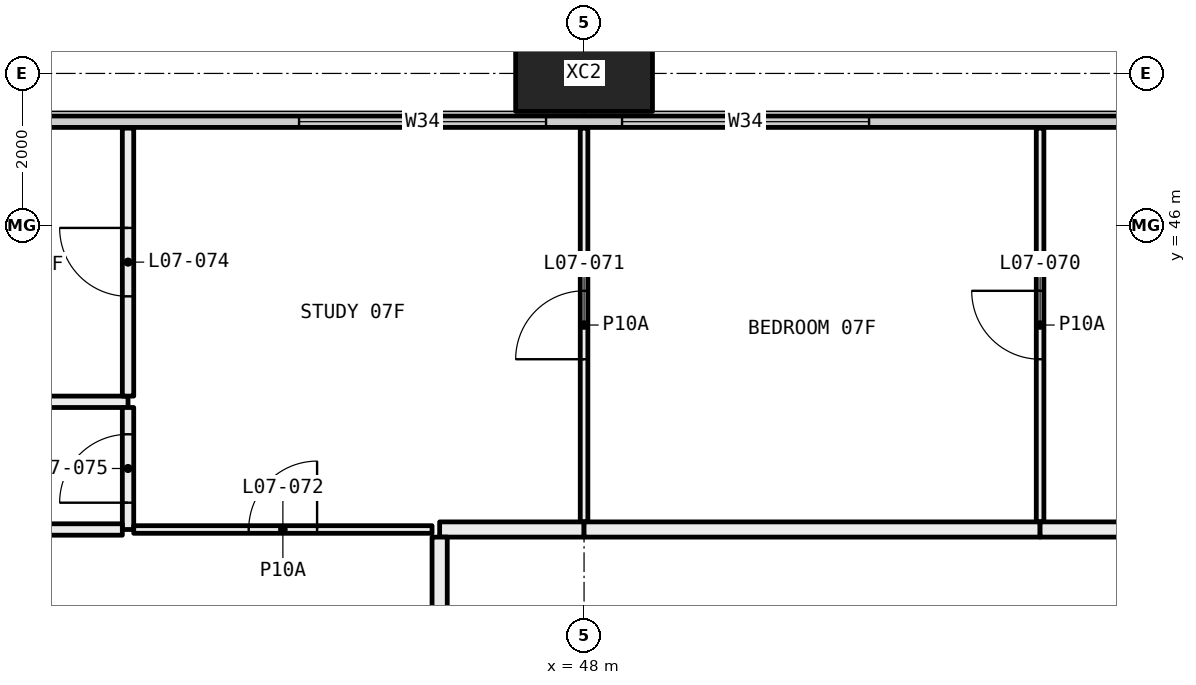
"""IFC4 building model, lengths in metres.
Left out: names, types, materials, properties, quantities, classifications, styles, units other than length and angle.
Written with IfcOpenShell. Run it as: python <this file> out.ifc"""

import sys

from ifc_helpers import new_model, si_unit, direction, frame, frame_2d, origin, origin_2d, place, context, subcontext, project, spatial, rectangle, hollow_rectangle, extrude, element, fill, save


model = new_model("IFC4")
c1 = context("Model", 3, precision=1e-05, world=origin(), true_north=direction((0.0, 1.0)))
c2 = subcontext(c1, "Body", "Model", "MODEL_VIEW")
j1 = project(units=[si_unit("LENGTHUNIT", "METRE"), si_unit("PLANEANGLEUNIT", "RADIAN")], contexts=[c1])
p1 = place(None, origin())
s1 = spatial("IfcSite", under=j1, at=p1, CompositionType="ELEMENT")
p2 = place(p1, origin())
s2 = spatial("IfcBuilding", under=s1, at=p2, CompositionType="ELEMENT")
p3 = place(p2, frame((0.0, 0.0, 36.9)))
s3 = spatial("IfcBuildingStorey", under=s2, at=p3, CompositionType="ELEMENT", Elevation=36.9)
p4 = place(p3, frame((48.0, 48.0, -0.4), z_axis=(0.0, 0.0, 1.0), x_axis=(1.0, 0.0, 0.0)))
e1 = element("IfcColumn", 1, at=p4, inside=s3, PredefinedType="COLUMN", context=c2, shape_type="SweptSolid", body=[
    extrude(hollow_rectangle(XDim=1.8, YDim=1.0, WallThickness=0.07, at=origin_2d()), origin(), (0.0, 0.0, 1.0), 3.45),
])
p5 = place(p3, frame((6.56, 47.365, 0.0), z_axis=(0.0, 0.0, 1.0), x_axis=(1.0, 0.0, 0.0)))
e2 = element("IfcWall", 2, at=p5, inside=s3, PredefinedType="ELEMENTEDWALL", context=c2, shape_type="SweptSolid", body=[
    extrude(rectangle(XDim=58.88, YDim=0.15, at=frame_2d((29.44, 0.0))), origin(), (0.0, 0.0, 1.0), 3.05),
])
p6 = place(p5, frame((0.44, 0.0, 0.45)))
e3 = element("IfcOpeningElement", 3, at=p6, cuts=e2, PredefinedType="OPENING", context=c2, shape_type="SweptSolid", body=[
    extrude(rectangle(XDim=4.5, YDim=2.55, at=frame_2d((2.25, 1.275))), frame((0.0, 0.085, 0.0), z_axis=(0.0, -1.0, 0.0), x_axis=(1.0, 0.0, 0.0)), (0.0, 0.0, 1.0), 0.17),
])
p7 = place(p5, frame((5.94, 0.0, 0.45)))
e4 = element("IfcOpeningElement", 4, at=p7, cuts=e2, PredefinedType="OPENING", context=c2, shape_type="SweptSolid", body=[
    extrude(rectangle(XDim=3.25, YDim=2.55, at=frame_2d((1.625, 1.275))), frame((0.0, 0.085, 0.0), z_axis=(0.0, -1.0, 0.0), x_axis=(1.0, 0.0, 0.0)), (0.0, 0.0, 1.0), 0.17),
])
p8 = place(p5, frame((13.69, 0.0, 0.45)))
e5 = element("IfcOpeningElement", 5, at=p8, cuts=e2, PredefinedType="OPENING", context=c2, shape_type="SweptSolid", body=[
    extrude(rectangle(XDim=3.25, YDim=2.55, at=frame_2d((1.625, 1.275))), frame((0.0, 0.085, 0.0), z_axis=(0.0, -1.0, 0.0), x_axis=(1.0, 0.0, 0.0)), (0.0, 0.0, 1.0), 0.17),
])
p9 = place(p5, frame((17.94, 0.0, 0.45)))
e6 = element("IfcOpeningElement", 6, at=p9, cuts=e2, PredefinedType="OPENING", context=c2, shape_type="SweptSolid", body=[
    extrude(rectangle(XDim=3.25, YDim=2.55, at=frame_2d((1.625, 1.275))), frame((0.0, 0.085, 0.0), z_axis=(0.0, -1.0, 0.0), x_axis=(1.0, 0.0, 0.0)), (0.0, 0.0, 1.0), 0.17),
])
p10 = place(p5, frame((26.94, 0.0, 0.45)))
e7 = element("IfcOpeningElement", 7, at=p10, cuts=e2, PredefinedType="OPENING", context=c2, shape_type="SweptSolid", body=[
    extrude(rectangle(XDim=2.0, YDim=2.55, at=frame_2d((1.0, 1.275))), frame((0.0, 0.085, 0.0), z_axis=(0.0, -1.0, 0.0), x_axis=(1.0, 0.0, 0.0)), (0.0, 0.0, 1.0), 0.17),
])
p11 = place(p5, frame((29.94, 0.0, 0.45)))
e8 = element("IfcOpeningElement", 8, at=p11, cuts=e2, PredefinedType="OPENING", context=c2, shape_type="SweptSolid", body=[
    extrude(rectangle(XDim=3.25, YDim=2.55, at=frame_2d((1.625, 1.275))), frame((0.0, 0.085, 0.0), z_axis=(0.0, -1.0, 0.0), x_axis=(1.0, 0.0, 0.0)), (0.0, 0.0, 1.0), 0.17),
])
p12 = place(p5, frame((37.69, 0.0, 0.45)))
e9 = element("IfcOpeningElement", 9, at=p12, cuts=e2, PredefinedType="OPENING", context=c2, shape_type="SweptSolid", body=[
    extrude(rectangle(XDim=3.25, YDim=2.55, at=frame_2d((1.625, 1.275))), frame((0.0, 0.085, 0.0), z_axis=(0.0, -1.0, 0.0), x_axis=(1.0, 0.0, 0.0)), (0.0, 0.0, 1.0), 0.17),
])
p13 = place(p5, frame((41.94, 0.0, 0.45)))
e10 = element("IfcOpeningElement", 10, at=p13, cuts=e2, PredefinedType="OPENING", context=c2, shape_type="SweptSolid", body=[
    extrude(rectangle(XDim=3.25, YDim=2.55, at=frame_2d((1.625, 1.275))), frame((0.0, 0.085, 0.0), z_axis=(0.0, -1.0, 0.0), x_axis=(1.0, 0.0, 0.0)), (0.0, 0.0, 1.0), 0.17),
])
p14 = place(p5, frame((50.94, 0.0, 0.45)))
e11 = element("IfcOpeningElement", 11, at=p14, cuts=e2, PredefinedType="OPENING", context=c2, shape_type="SweptSolid", body=[
    extrude(rectangle(XDim=2.0, YDim=2.55, at=frame_2d((1.0, 1.275))), frame((0.0, 0.085, 0.0), z_axis=(0.0, -1.0, 0.0), x_axis=(1.0, 0.0, 0.0)), (0.0, 0.0, 1.0), 0.17),
])
p15 = place(p5, frame((53.94, 0.0, 0.45)))
e12 = element("IfcOpeningElement", 12, at=p15, cuts=e2, PredefinedType="OPENING", context=c2, shape_type="SweptSolid", body=[
    extrude(rectangle(XDim=4.5, YDim=2.55, at=frame_2d((2.25, 1.275))), frame((0.0, 0.085, 0.0), z_axis=(0.0, -1.0, 0.0), x_axis=(1.0, 0.0, 0.0)), (0.0, 0.0, 1.0), 0.17),
])
p16 = place(p3, frame((36.1, 43.68, 0.0), z_axis=(0.0, 0.0, 1.0), x_axis=(1.0, 0.0, 0.0)))
e13 = element("IfcWall", 13, at=p16, inside=s3, PredefinedType="PARTITIONING", context=c2, shape_type="SweptSolid", body=[
    extrude(rectangle(XDim=5.9, YDim=0.15, at=frame_2d((2.95, 0.0))), origin(), (0.0, 0.0, 1.0), 3.05),
])
p17 = place(p3, frame((42.0, 43.755, 0.0), z_axis=(0.0, 0.0, 1.0), x_axis=(0.0, 1.0, 0.0)))
e14 = element("IfcWall", 14, at=p17, inside=s3, PredefinedType="PARTITIONING", context=c2, shape_type="SweptSolid", body=[
    extrude(rectangle(XDim=3.525, YDim=0.15, at=frame_2d((1.763, 0.0))), origin(), (0.0, 0.0, 1.0), 3.05),
])
p18 = place(p17, frame((1.312, 0.0, 0.0)))
e15 = element("IfcOpeningElement", 15, at=p18, cuts=e14, PredefinedType="OPENING", context=c2, shape_type="SweptSolid", body=[
    extrude(rectangle(XDim=0.9, YDim=2.1, at=frame_2d((0.45, 1.05))), frame((0.0, 0.085, 0.0), z_axis=(0.0, -1.0, 0.0), x_axis=(1.0, 0.0, 0.0)), (0.0, 0.0, 1.0), 0.17),
])
p19 = place(p3, frame((42.0, 42.0, 0.0), z_axis=(0.0, 0.0, 1.0), x_axis=(0.0, 1.0, 0.0)))
e16 = element("IfcWall", 16, at=p19, inside=s3, PredefinedType="PARTITIONING", context=c2, shape_type="SweptSolid", body=[
    extrude(rectangle(XDim=1.605, YDim=0.15, at=frame_2d((0.802, 0.0))), origin(), (0.0, 0.0, 1.0), 3.05),
])
p20 = place(p19, frame((0.353, 0.0, 0.0)))
e17 = element("IfcOpeningElement", 17, at=p20, cuts=e16, PredefinedType="OPENING", context=c2, shape_type="SweptSolid", body=[
    extrude(rectangle(XDim=0.9, YDim=2.1, at=frame_2d((0.45, 1.05))), frame((0.0, 0.085, 0.0), z_axis=(0.0, -1.0, 0.0), x_axis=(1.0, 0.0, 0.0)), (0.0, 0.0, 1.0), 0.17),
])
p21 = place(p3, frame((40.5, 42.0, 0.0), z_axis=(0.0, 0.0, 1.0), x_axis=(1.0, 0.0, 0.0)))
e18 = element("IfcWall", 18, at=p21, inside=s3, PredefinedType="PARTITIONING", context=c2, shape_type="SweptSolid", body=[
    extrude(rectangle(XDim=1.425, YDim=0.15, at=frame_2d((0.712, 0.0))), origin(), (0.0, 0.0, 1.0), 3.05),
])
p22 = place(p3, frame((48.0, 42.1, 0.0), z_axis=(0.0, 0.0, 1.0), x_axis=(0.0, 1.0, 0.0)))
e19 = element("IfcWall", 19, at=p22, inside=s3, PredefinedType="PARTITIONING", context=c2, shape_type="SweptSolid", body=[
    extrude(rectangle(XDim=5.18, YDim=0.1, at=frame_2d((2.59, 0.0))), origin(), (0.0, 0.0, 1.0), 3.05),
])
p23 = place(p22, frame((2.14, 0.0, 0.0)))
e20 = element("IfcOpeningElement", 20, at=p23, cuts=e19, PredefinedType="OPENING", context=c2, shape_type="SweptSolid", body=[
    extrude(rectangle(XDim=0.9, YDim=2.1, at=frame_2d((0.45, 1.05))), frame((0.0, 0.06, 0.0), z_axis=(0.0, -1.0, 0.0), x_axis=(1.0, 0.0, 0.0)), (0.0, 0.0, 1.0), 0.12),
])
p24 = place(p3, frame((42.075, 42.0, 0.0), z_axis=(0.0, 0.0, 1.0), x_axis=(1.0, 0.0, 0.0)))
e21 = element("IfcWall", 21, at=p24, inside=s3, PredefinedType="PARTITIONING", context=c2, shape_type="SweptSolid", body=[
    extrude(rectangle(XDim=3.925, YDim=0.1, at=frame_2d((1.962, 0.0))), origin(), (0.0, 0.0, 1.0), 3.05),
])
p25 = place(p24, frame((1.512, 0.0, 0.0)))
e22 = element("IfcOpeningElement", 22, at=p25, cuts=e21, PredefinedType="OPENING", context=c2, shape_type="SweptSolid", body=[
    extrude(rectangle(XDim=0.9, YDim=2.1, at=frame_2d((0.45, 1.05))), frame((0.0, 0.06, 0.0), z_axis=(0.0, -1.0, 0.0), x_axis=(1.0, 0.0, 0.0)), (0.0, 0.0, 1.0), 0.12),
])
p26 = place(p3, frame((46.1, 42.0, 0.0), z_axis=(0.0, 0.0, 1.0), x_axis=(1.0, 0.0, 0.0)))
e23 = element("IfcWall", 23, at=p26, inside=s3, PredefinedType="PARTITIONING", context=c2, shape_type="SweptSolid", body=[
    extrude(rectangle(XDim=1.9, YDim=0.2, at=frame_2d((0.95, 0.0))), origin(), (0.0, 0.0, 1.0), 3.05),
])
p27 = place(p3, frame((54.0, 42.1, 0.0), z_axis=(0.0, 0.0, 1.0), x_axis=(0.0, 1.0, 0.0)))
e24 = element("IfcWall", 24, at=p27, inside=s3, PredefinedType="PARTITIONING", context=c2, shape_type="SweptSolid", body=[
    extrude(rectangle(XDim=5.18, YDim=0.1, at=frame_2d((2.59, 0.0))), origin(), (0.0, 0.0, 1.0), 3.05),
])
p28 = place(p27, frame((2.14, 0.0, 0.0)))
e25 = element("IfcOpeningElement", 25, at=p28, cuts=e24, PredefinedType="OPENING", context=c2, shape_type="SweptSolid", body=[
    extrude(rectangle(XDim=0.9, YDim=2.1, at=frame_2d((0.45, 1.05))), frame((0.0, 0.06, 0.0), z_axis=(0.0, -1.0, 0.0), x_axis=(1.0, 0.0, 0.0)), (0.0, 0.0, 1.0), 0.12),
])
p29 = place(p3, frame((48.0, 42.0, 0.0), z_axis=(0.0, 0.0, 1.0), x_axis=(1.0, 0.0, 0.0)))
e26 = element("IfcWall", 26, at=p29, inside=s3, PredefinedType="PARTITIONING", context=c2, shape_type="SweptSolid", body=[
    extrude(rectangle(XDim=6.0, YDim=0.2, at=frame_2d((3.0, 0.0))), origin(), (0.0, 0.0, 1.0), 3.05),
])
p30 = place(p3, frame((54.0, 42.0, 0.0), z_axis=(0.0, 0.0, 1.0), x_axis=(1.0, 0.0, 0.0)))
e27 = element("IfcWall", 27, at=p30, inside=s3, PredefinedType="PARTITIONING", context=c2, shape_type="SweptSolid", body=[
    extrude(rectangle(XDim=6.0, YDim=0.2, at=frame_2d((3.0, 0.0))), origin(), (0.0, 0.0, 1.0), 3.05),
])
p31 = place(p30, frame((2.5, 0.0, 0.0)))
e28 = element("IfcOpeningElement", 28, at=p31, cuts=e27, PredefinedType="OPENING", context=c2, shape_type="SweptSolid", body=[
    extrude(rectangle(XDim=1.0, YDim=2.1, at=frame_2d((0.5, 1.05))), frame((0.0, 0.11, 0.0), z_axis=(0.0, -1.0, 0.0), x_axis=(1.0, 0.0, 0.0)), (0.0, 0.0, 1.0), 0.22),
])
p32 = place(p3, frame((46.1, 36.1, 0.0), z_axis=(0.0, 0.0, 1.0), x_axis=(0.0, 1.0, 0.0)))
e29 = element("IfcWall", 29, at=p32, inside=s3, PredefinedType="PARTITIONING", context=c2, shape_type="SweptSolid", body=[
    extrude(rectangle(XDim=5.8, YDim=0.2, at=frame_2d((2.9, 0.0))), origin(), (0.0, 0.0, 1.0), 3.05),
])
p33 = place(p12, origin())
e30 = element("IfcWindow", 30, at=p33, inside=s3, PartitioningType="SINGLE_PANEL", PredefinedType="WINDOW", context=c2, shape_type="SweptSolid", body=[
    extrude(rectangle(XDim=3.25, YDim=2.55, at=frame_2d((1.625, 1.275))), frame((0.0, 0.03, 0.0), z_axis=(0.0, -1.0, 0.0), x_axis=(1.0, 0.0, 0.0)), (0.0, 0.0, 1.0), 0.06),
])
fill(e9, e30)
p34 = place(p13, origin())
e31 = element("IfcWindow", 31, at=p34, inside=s3, PartitioningType="SINGLE_PANEL", PredefinedType="WINDOW", context=c2, shape_type="SweptSolid", body=[
    extrude(rectangle(XDim=3.25, YDim=2.55, at=frame_2d((1.625, 1.275))), frame((0.0, 0.03, 0.0), z_axis=(0.0, -1.0, 0.0), x_axis=(1.0, 0.0, 0.0)), (0.0, 0.0, 1.0), 0.06),
])
fill(e10, e31)
p35 = place(p28, origin())
e32 = element("IfcDoor", 32, at=p35, inside=s3, OperationType="SINGLE_SWING_LEFT", PredefinedType="DOOR", context=c2, shape_type="SweptSolid", body=[
    extrude(rectangle(XDim=0.9, YDim=2.1, at=frame_2d((0.45, 1.05))), frame((0.0, 0.025, 0.0), z_axis=(0.0, -1.0, 0.0), x_axis=(1.0, 0.0, 0.0)), (0.0, 0.0, 1.0), 0.05),
])
fill(e25, e32)
p36 = place(p23, origin())
e33 = element("IfcDoor", 33, at=p36, inside=s3, OperationType="SINGLE_SWING_RIGHT", PredefinedType="DOOR", context=c2, shape_type="SweptSolid", body=[
    extrude(rectangle(XDim=0.9, YDim=2.1, at=frame_2d((0.45, 1.05))), frame((0.0, 0.025, 0.0), z_axis=(0.0, -1.0, 0.0), x_axis=(1.0, 0.0, 0.0)), (0.0, 0.0, 1.0), 0.05),
])
fill(e20, e33)
p37 = place(p25, origin())
e34 = element("IfcDoor", 34, at=p37, inside=s3, OperationType="SINGLE_SWING_LEFT", PredefinedType="DOOR", context=c2, shape_type="SweptSolid", body=[
    extrude(rectangle(XDim=0.9, YDim=2.1, at=frame_2d((0.45, 1.05))), frame((0.0, 0.025, 0.0), z_axis=(0.0, -1.0, 0.0), x_axis=(1.0, 0.0, 0.0)), (0.0, 0.0, 1.0), 0.05),
])
fill(e22, e34)
p38 = place(p18, origin())
e35 = element("IfcDoor", 35, at=p38, inside=s3, OperationType="SINGLE_SWING_LEFT", PredefinedType="DOOR", context=c2, shape_type="SweptSolid", body=[
    extrude(rectangle(XDim=0.9, YDim=2.1, at=frame_2d((0.45, 1.05))), frame((0.0, 0.025, 0.0), z_axis=(0.0, -1.0, 0.0), x_axis=(1.0, 0.0, 0.0)), (0.0, 0.0, 1.0), 0.05),
])
fill(e15, e35)
p39 = place(p20, origin())
e36 = element("IfcDoor", 36, at=p39, inside=s3, OperationType="SINGLE_SWING_RIGHT", PredefinedType="DOOR", context=c2, shape_type="SweptSolid", body=[
    extrude(rectangle(XDim=0.9, YDim=2.1, at=frame_2d((0.45, 1.05))), frame((0.0, 0.025, 0.0), z_axis=(0.0, -1.0, 0.0), x_axis=(1.0, 0.0, 0.0)), (0.0, 0.0, 1.0), 0.05),
])
fill(e17, e36)
save(model, sys.argv[1])
